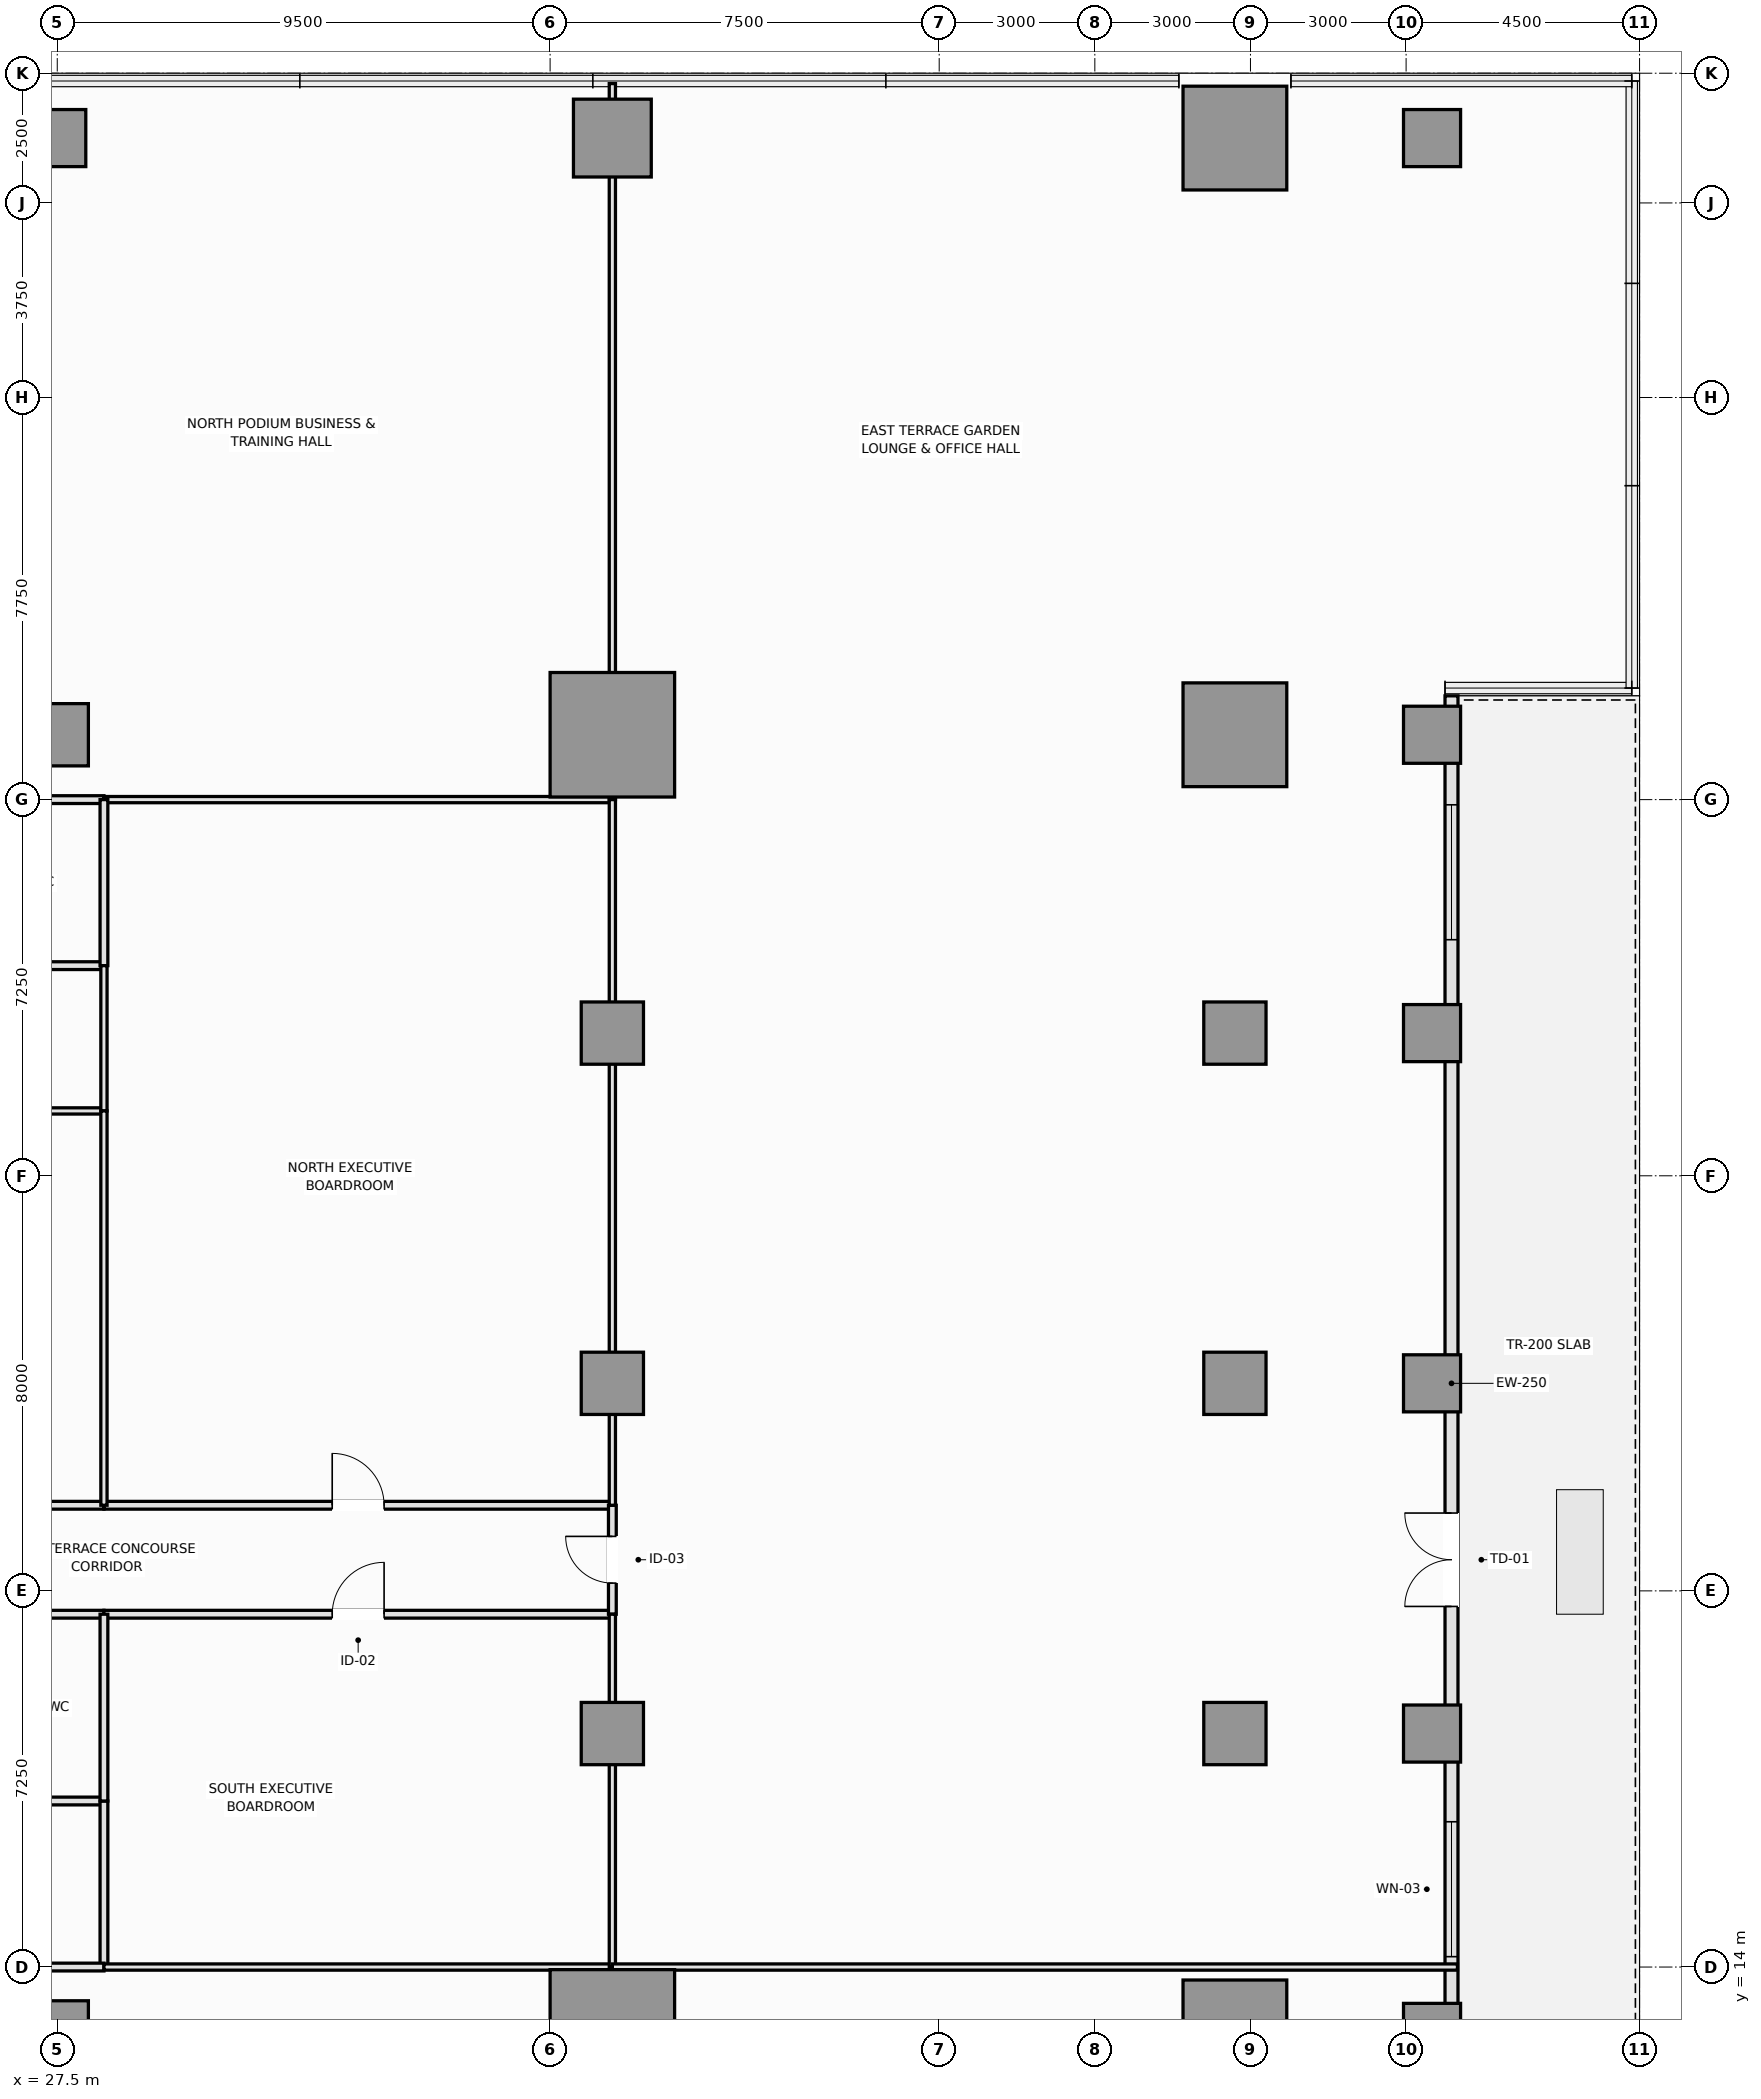
"""IFC4 building model, lengths in metres.
Left out: names, types, materials, properties, quantities, classifications, styles, units other than length and angle.
Written with IfcOpenShell. Run it as: python <this file> out.ifc"""

import sys

from ifc_helpers import new_model, si_unit, direction, frame, frame_2d, origin, origin_2d, place, context, subcontext, project, spatial, rectangle, extrude, element, fill, save


model = new_model("IFC4")
c1 = context("Model", 3, precision=1e-05, world=origin(), true_north=direction((0.0, 1.0)))
c2 = subcontext(c1, "Body", "Model", "MODEL_VIEW")
j1 = project(units=[si_unit("LENGTHUNIT", "METRE"), si_unit("PLANEANGLEUNIT", "RADIAN")], contexts=[c1])
p1 = place(None, origin())
s1 = spatial("IfcSite", under=j1, at=p1, CompositionType="ELEMENT")
p2 = place(p1, origin())
s2 = spatial("IfcBuilding", under=s1, at=p2, CompositionType="ELEMENT")
p3 = place(p2, frame((0.0, 0.0, 20.4)))
s3 = spatial("IfcBuildingStorey", under=s2, at=p3, CompositionType="ELEMENT", Elevation=20.4)
for number, where, z_axis, x_axis in (
    (1, (38.2, 12.75, 0.0), (0.0, 0.0, 1.0), (1.0, 0.0, 0.0)),
    (2, (38.2, 37.75, 0.0), (0.0, 0.0, 1.0), (1.0, 0.0, 0.0)),
):
    element("IfcColumn", number, at=place(p3, frame(where, z_axis=z_axis, x_axis=x_axis)), inside=s3, PredefinedType="COLUMN", context=c2, shape_type="SweptSolid", body=[
        extrude(rectangle(XDim=2.4, YDim=2.4, at=origin_2d()), origin(), (0.0, 0.0, 1.0), 5.2),
    ])
for number, where, z_axis, x_axis in (
    (3, (27.5, 12.75, 0.0), (0.0, 0.0, 1.0), (1.0, 0.0, 0.0)),
    (4, (27.5, 37.75, 0.0), (0.0, 0.0, 1.0), (1.0, 0.0, 0.0)),
    (5, (38.2, 18.5, 0.0), (0.0, 0.0, 1.0), (1.0, 0.0, 0.0)),
    (6, (38.2, 25.25, 0.0), (0.0, 0.0, 1.0), (1.0, 0.0, 0.0)),
    (7, (38.2, 32.0, 0.0), (0.0, 0.0, 1.0), (1.0, 0.0, 0.0)),
):
    element("IfcColumn", number, at=place(p3, frame(where, z_axis=z_axis, x_axis=x_axis)), inside=s3, PredefinedType="COLUMN", context=c2, shape_type="SweptSolid", body=[
        extrude(rectangle(XDim=1.2, YDim=1.2, at=origin_2d()), origin(), (0.0, 0.0, 1.0), 5.2),
    ])
for number, where, z_axis, x_axis in (
    (8, (50.2, 12.75, 0.0), (0.0, 0.0, 1.0), (1.0, 0.0, 0.0)),
    (9, (50.2, 37.75, 0.0), (0.0, 0.0, 1.0), (1.0, 0.0, 0.0)),
    (10, (50.2, 49.25, 0.0), (0.0, 0.0, 1.0), (1.0, 0.0, 0.0)),
):
    element("IfcColumn", number, at=place(p3, frame(where, z_axis=z_axis, x_axis=x_axis)), inside=s3, PredefinedType="COLUMN", context=c2, shape_type="SweptSolid", body=[
        extrude(rectangle(XDim=2.0, YDim=2.0, at=origin_2d()), origin(), (0.0, 0.0, 1.0), 5.2),
    ])
for number, where, z_axis, x_axis in (
    (11, (50.2, 18.5, 0.0), (0.0, 0.0, 1.0), (1.0, 0.0, 0.0)),
    (12, (50.2, 25.25, 0.0), (0.0, 0.0, 1.0), (1.0, 0.0, 0.0)),
    (13, (50.2, 32.0, 0.0), (0.0, 0.0, 1.0), (1.0, 0.0, 0.0)),
):
    element("IfcColumn", number, at=place(p3, frame(where, z_axis=z_axis, x_axis=x_axis)), inside=s3, PredefinedType="COLUMN", context=c2, shape_type="SweptSolid", body=[
        extrude(rectangle(XDim=1.2, YDim=1.2, at=origin_2d()), origin(), (0.0, 0.0, 1.0), 5.2),
    ])
for number, where, z_axis, x_axis in (
    (14, (54.0, 12.75, 0.0), (0.0, 0.0, 1.0), (1.0, 0.0, 0.0)),
    (15, (54.0, 18.5, 0.0), (0.0, 0.0, 1.0), (1.0, 0.0, 0.0)),
    (16, (54.0, 25.25, 0.0), (0.0, 0.0, 1.0), (1.0, 0.0, 0.0)),
    (17, (54.0, 32.0, 0.0), (0.0, 0.0, 1.0), (1.0, 0.0, 0.0)),
    (18, (54.0, 37.75, 0.0), (0.0, 0.0, 1.0), (1.0, 0.0, 0.0)),
    (19, (54.0, 49.25, 0.0), (0.0, 0.0, 1.0), (1.0, 0.0, 0.0)),
    (20, (27.5, 49.25, 0.0), (0.0, 0.0, 1.0), (1.0, 0.0, 0.0)),
):
    element("IfcColumn", number, at=place(p3, frame(where, z_axis=z_axis, x_axis=x_axis)), inside=s3, PredefinedType="COLUMN", context=c2, shape_type="SweptSolid", body=[
        extrude(rectangle(XDim=1.1, YDim=1.1, at=origin_2d()), origin(), (0.0, 0.0, 1.0), 5.2),
    ])
p4 = place(p3, frame((38.2, 49.25, 0.0), z_axis=(0.0, 0.0, 1.0), x_axis=(1.0, 0.0, 0.0)))
e21 = element("IfcColumn", 21, at=p4, inside=s3, PredefinedType="COLUMN", context=c2, shape_type="SweptSolid", body=[
    extrude(rectangle(XDim=1.5, YDim=1.5, at=origin_2d()), origin(), (0.0, 0.0, 1.0), 5.2),
])
p5 = place(p3, frame((54.375, 12.0, 0.0), z_axis=(0.0, 0.0, 1.0), x_axis=(0.0, 1.0, 0.0)))
e22 = element("IfcWall", 22, at=p5, inside=s3, PredefinedType="SOLIDWALL", context=c2, shape_type="SweptSolid", body=[
    extrude(rectangle(XDim=26.5, YDim=0.25, at=frame_2d((13.25, 0.0))), origin(), (0.0, 0.0, 1.0), 5.02),
])
p6 = place(p5, frame((8.95, 0.0, 0.0)))
e23 = element("IfcOpeningElement", 23, at=p6, cuts=e22, PredefinedType="OPENING", context=c2, shape_type="SweptSolid", body=[
    extrude(rectangle(XDim=1.8, YDim=2.2, at=frame_2d((0.9, 1.1))), frame((0.0, 0.135, 0.0), z_axis=(0.0, -1.0, 0.0), x_axis=(1.0, 0.0, 0.0)), (0.0, 0.0, 1.0), 0.27),
])
p7 = place(p5, frame((2.2, 0.0, 0.9)))
e24 = element("IfcOpeningElement", 24, at=p7, cuts=e22, PredefinedType="OPENING", context=c2, shape_type="SweptSolid", body=[
    extrude(rectangle(XDim=2.6, YDim=2.2, at=frame_2d((1.3, 1.1))), frame((0.0, 0.135, 0.0), z_axis=(0.0, -1.0, 0.0), x_axis=(1.0, 0.0, 0.0)), (0.0, 0.0, 1.0), 0.27),
])
p8 = place(p5, frame((21.8, 0.0, 0.9)))
e25 = element("IfcOpeningElement", 25, at=p8, cuts=e22, PredefinedType="OPENING", context=c2, shape_type="SweptSolid", body=[
    extrude(rectangle(XDim=2.6, YDim=2.2, at=frame_2d((1.3, 1.1))), frame((0.0, 0.135, 0.0), z_axis=(0.0, -1.0, 0.0), x_axis=(1.0, 0.0, 0.0)), (0.0, 0.0, 1.0), 0.27),
])
p9 = place(p3, frame((24.55, 20.8, 0.0), z_axis=(0.0, 0.0, 1.0), x_axis=(1.0, 0.0, 0.0)))
e26 = element("IfcWall", 26, at=p9, inside=s3, PredefinedType="PLUMBINGWALL", context=c2, shape_type="SweptSolid", body=[
    extrude(rectangle(XDim=3.85, YDim=0.15, at=frame_2d((1.925, 0.0))), origin(), (0.0, 0.0, 1.0), 5.02),
])
p10 = place(p3, frame((28.4, 20.8, 0.0), z_axis=(0.0, 0.0, 1.0), x_axis=(1.0, 0.0, 0.0)))
e27 = element("IfcWall", 27, at=p10, inside=s3, PredefinedType="PARTITIONING", context=c2, shape_type="SweptSolid", body=[
    extrude(rectangle(XDim=9.8, YDim=0.15, at=frame_2d((4.9, 0.0))), origin(), (0.0, 0.0, 1.0), 5.02),
])
p11 = place(p10, frame((4.4, 0.0, 0.0)))
e28 = element("IfcOpeningElement", 28, at=p11, cuts=e27, PredefinedType="OPENING", context=c2, shape_type="SweptSolid", body=[
    extrude(rectangle(XDim=1.0, YDim=2.15, at=frame_2d((0.5, 1.075))), frame((0.0, 0.085, 0.0), z_axis=(0.0, -1.0, 0.0), x_axis=(1.0, 0.0, 0.0)), (0.0, 0.0, 1.0), 0.17),
])
p12 = place(p3, frame((24.55, 22.9, 0.0), z_axis=(0.0, 0.0, 1.0), x_axis=(1.0, 0.0, 0.0)))
e29 = element("IfcWall", 29, at=p12, inside=s3, PredefinedType="PARTITIONING", context=c2, shape_type="SweptSolid", body=[
    extrude(rectangle(XDim=3.85, YDim=0.15, at=frame_2d((1.925, 0.0))), origin(), (0.0, 0.0, 1.0), 5.02),
])
p13 = place(p3, frame((28.4, 22.9, 0.0), z_axis=(0.0, 0.0, 1.0), x_axis=(1.0, 0.0, 0.0)))
e30 = element("IfcWall", 30, at=p13, inside=s3, PredefinedType="PARTITIONING", context=c2, shape_type="SweptSolid", body=[
    extrude(rectangle(XDim=9.8, YDim=0.15, at=frame_2d((4.9, 0.0))), origin(), (0.0, 0.0, 1.0), 5.02),
])
p14 = place(p13, frame((4.4, 0.0, 0.0)))
e31 = element("IfcOpeningElement", 31, at=p14, cuts=e30, PredefinedType="OPENING", context=c2, shape_type="SweptSolid", body=[
    extrude(rectangle(XDim=1.0, YDim=2.15, at=frame_2d((0.5, 1.075))), frame((0.0, 0.085, 0.0), z_axis=(0.0, -1.0, 0.0), x_axis=(1.0, 0.0, 0.0)), (0.0, 0.0, 1.0), 0.17),
])
p15 = place(p3, frame((38.2, 20.8, 0.0), z_axis=(0.0, 0.0, 1.0), x_axis=(0.0, 1.0, 0.0)))
e32 = element("IfcWall", 32, at=p15, inside=s3, PredefinedType="PARTITIONING", context=c2, shape_type="SweptSolid", body=[
    extrude(rectangle(XDim=2.1, YDim=0.15, at=frame_2d((1.05, 0.0))), origin(), (0.0, 0.0, 1.0), 4.42),
])
p16 = place(p15, frame((0.6, 0.0, 0.0)))
e33 = element("IfcOpeningElement", 33, at=p16, cuts=e32, PredefinedType="OPENING", context=c2, shape_type="SweptSolid", body=[
    extrude(rectangle(XDim=0.9, YDim=2.1, at=frame_2d((0.45, 1.05))), frame((0.0, 0.085, 0.0), z_axis=(0.0, -1.0, 0.0), x_axis=(1.0, 0.0, 0.0)), (0.0, 0.0, 1.0), 0.17),
])
p17 = place(p3, frame((24.55, 36.5, 0.0), z_axis=(0.0, 0.0, 1.0), x_axis=(1.0, 0.0, 0.0)))
e34 = element("IfcWall", 34, at=p17, inside=s3, PredefinedType="PLUMBINGWALL", context=c2, shape_type="SweptSolid", body=[
    extrude(rectangle(XDim=3.85, YDim=0.15, at=frame_2d((1.925, 0.0))), origin(), (0.0, 0.0, 1.0), 5.02),
])
p18 = place(p3, frame((28.4, 36.5, 0.0), z_axis=(0.0, 0.0, 1.0), x_axis=(1.0, 0.0, 0.0)))
e35 = element("IfcWall", 35, at=p18, inside=s3, PredefinedType="PARTITIONING", context=c2, shape_type="SweptSolid", body=[
    extrude(rectangle(XDim=9.8, YDim=0.12, at=frame_2d((4.9, 0.0))), origin(), (0.0, 0.0, 1.0), 5.02),
])
p19 = place(p3, frame((38.2, 36.5, 0.0), z_axis=(0.0, 0.0, 1.0), x_axis=(0.0, 1.0, 0.0)))
e36 = element("IfcWall", 36, at=p19, inside=s3, PredefinedType="PARTITIONING", context=c2, shape_type="SweptSolid", body=[
    extrude(rectangle(XDim=13.8, YDim=0.12, at=frame_2d((6.9, 0.0))), origin(), (0.0, 0.0, 1.0), 3.0),
])
p20 = place(p3, frame((24.55, 17.2, 0.0), z_axis=(0.0, 0.0, 1.0), x_axis=(1.0, 0.0, 0.0)))
e37 = element("IfcWall", 37, at=p20, inside=s3, PredefinedType="PLUMBINGWALL", context=c2, shape_type="SweptSolid", body=[
    extrude(rectangle(XDim=3.85, YDim=0.15, at=frame_2d((1.925, 0.0))), origin(), (0.0, 0.0, 1.0), 5.02),
])
p21 = place(p3, frame((28.4, 14.0, 0.0), z_axis=(0.0, 0.0, 1.0), x_axis=(0.0, 1.0, 0.0)))
e38 = element("IfcWall", 38, at=p21, inside=s3, PredefinedType="PLUMBINGWALL", context=c2, shape_type="SweptSolid", body=[
    extrude(rectangle(XDim=3.2, YDim=0.15, at=frame_2d((1.6, 0.0))), origin(), (0.0, 0.0, 1.0), 5.02),
])
for number, where, z_axis, x_axis in (
    (39, (24.55, 14.0, 0.0), (0.0, 0.0, 1.0), (1.0, 0.0, 0.0)),
    (40, (24.55, 33.3, 0.0), (0.0, 0.0, 1.0), (1.0, 0.0, 0.0)),
):
    element("IfcWall", number, at=place(p3, frame(where, z_axis=z_axis, x_axis=x_axis)), inside=s3, PredefinedType="PLUMBINGWALL", context=c2, shape_type="SweptSolid", body=[
        extrude(rectangle(XDim=3.85, YDim=0.15, at=frame_2d((1.925, 0.0))), origin(), (0.0, 0.0, 1.0), 5.02),
    ])
p22 = place(p3, frame((28.4, 33.3, 0.0), z_axis=(0.0, 0.0, 1.0), x_axis=(0.0, 1.0, 0.0)))
e41 = element("IfcWall", 41, at=p22, inside=s3, PredefinedType="PLUMBINGWALL", context=c2, shape_type="SweptSolid", body=[
    extrude(rectangle(XDim=3.2, YDim=0.15, at=frame_2d((1.6, 0.0))), origin(), (0.0, 0.0, 1.0), 5.02),
])
p23 = place(p3, frame((28.4, 17.2, 0.0), z_axis=(0.0, 0.0, 1.0), x_axis=(0.0, 1.0, 0.0)))
e42 = element("IfcWall", 42, at=p23, inside=s3, PredefinedType="PLUMBINGWALL", context=c2, shape_type="SweptSolid", body=[
    extrude(rectangle(XDim=3.6, YDim=0.15, at=frame_2d((1.8, 0.0))), origin(), (0.0, 0.0, 1.0), 5.02),
])
p24 = place(p3, frame((24.55, 30.5, 0.0), z_axis=(0.0, 0.0, 1.0), x_axis=(1.0, 0.0, 0.0)))
e43 = element("IfcWall", 43, at=p24, inside=s3, PredefinedType="PARTITIONING", context=c2, shape_type="SweptSolid", body=[
    extrude(rectangle(XDim=3.85, YDim=0.12, at=frame_2d((1.925, 0.0))), origin(), (0.0, 0.0, 1.0), 5.02),
])
p25 = place(p3, frame((28.4, 30.5, 0.0), z_axis=(0.0, 0.0, 1.0), x_axis=(0.0, 1.0, 0.0)))
e44 = element("IfcWall", 44, at=p25, inside=s3, PredefinedType="PARTITIONING", context=c2, shape_type="SweptSolid", body=[
    extrude(rectangle(XDim=2.8, YDim=0.12, at=frame_2d((1.4, 0.0))), origin(), (0.0, 0.0, 1.0), 5.02),
])
p26 = place(p3, frame((28.4, 14.0, 0.0), z_axis=(0.0, 0.0, 1.0), x_axis=(1.0, 0.0, 0.0)))
e45 = element("IfcWall", 45, at=p26, inside=s3, PredefinedType="PARTITIONING", context=c2, shape_type="SweptSolid", body=[
    extrude(rectangle(XDim=9.8, YDim=0.12, at=frame_2d((4.9, 0.0))), origin(), (0.0, 0.0, 1.0), 5.02),
])
p27 = place(p3, frame((38.2, 14.0, 0.0), z_axis=(0.0, 0.0, 1.0), x_axis=(0.0, 1.0, 0.0)))
e46 = element("IfcWall", 46, at=p27, inside=s3, PredefinedType="PARTITIONING", context=c2, shape_type="SweptSolid", body=[
    extrude(rectangle(XDim=6.8, YDim=0.12, at=frame_2d((3.4, 0.0))), origin(), (0.0, 0.0, 1.0), 4.42),
])
p28 = place(p3, frame((28.4, 22.9, 0.0), z_axis=(0.0, 0.0, 1.0), x_axis=(0.0, 1.0, 0.0)))
e47 = element("IfcWall", 47, at=p28, inside=s3, PredefinedType="PARTITIONING", context=c2, shape_type="SweptSolid", body=[
    extrude(rectangle(XDim=7.6, YDim=0.12, at=frame_2d((3.8, 0.0))), origin(), (0.0, 0.0, 1.0), 5.02),
])
p29 = place(p3, frame((38.2, 22.9, 0.0), z_axis=(0.0, 0.0, 1.0), x_axis=(0.0, 1.0, 0.0)))
e48 = element("IfcWall", 48, at=p29, inside=s3, PredefinedType="PARTITIONING", context=c2, shape_type="SweptSolid", body=[
    extrude(rectangle(XDim=13.6, YDim=0.12, at=frame_2d((6.8, 0.0))), origin(), (0.0, 0.0, 1.0), 4.42),
])
p30 = place(p3, frame((38.2, 14.0, 0.0), z_axis=(0.0, 0.0, 1.0), x_axis=(1.0, 0.0, 0.0)))
e49 = element("IfcWall", 49, at=p30, inside=s3, PredefinedType="PARTITIONING", context=c2, shape_type="SweptSolid", body=[
    extrude(rectangle(XDim=16.29, YDim=0.12, at=frame_2d((8.145, 0.0))), origin(), (0.0, 0.0, 1.0), 5.02),
])
p31 = place(p6, frame((1.8, 0.0, 0.0), z_axis=(0.0, 0.0, 1.0), x_axis=(-1.0, 0.0, 0.0)))
e50 = element("IfcDoor", 50, at=p31, inside=s3, OperationType="DOUBLE_DOOR_SINGLE_SWING", PredefinedType="DOOR", context=c2, shape_type="SweptSolid", body=[
    extrude(rectangle(XDim=1.8, YDim=2.2, at=frame_2d((0.9, 1.1))), frame((0.0, 0.025, 0.0), z_axis=(0.0, -1.0, 0.0), x_axis=(1.0, 0.0, 0.0)), (0.0, 0.0, 1.0), 0.05),
])
fill(e23, e50)
p32 = place(p7, origin())
e51 = element("IfcWindow", 51, at=p32, inside=s3, PartitioningType="SINGLE_PANEL", PredefinedType="WINDOW", context=c2, shape_type="SweptSolid", body=[
    extrude(rectangle(XDim=2.6, YDim=2.2, at=frame_2d((1.3, 1.1))), frame((0.0, 0.03, 0.0), z_axis=(0.0, -1.0, 0.0), x_axis=(1.0, 0.0, 0.0)), (0.0, 0.0, 1.0), 0.06),
])
fill(e24, e51)
p33 = place(p8, origin())
e52 = element("IfcWindow", 52, at=p33, inside=s3, PartitioningType="SINGLE_PANEL", PredefinedType="WINDOW", context=c2, shape_type="SweptSolid", body=[
    extrude(rectangle(XDim=2.6, YDim=2.2, at=frame_2d((1.3, 1.1))), frame((0.0, 0.03, 0.0), z_axis=(0.0, -1.0, 0.0), x_axis=(1.0, 0.0, 0.0)), (0.0, 0.0, 1.0), 0.06),
])
fill(e25, e52)
p34 = place(p11, origin())
e53 = element("IfcDoor", 53, at=p34, inside=s3, OperationType="SINGLE_SWING_RIGHT", PredefinedType="DOOR", context=c2, shape_type="SweptSolid", body=[
    extrude(rectangle(XDim=1.0, YDim=2.15, at=frame_2d((0.5, 1.075))), frame((0.0, 0.025, 0.0), z_axis=(0.0, -1.0, 0.0), x_axis=(1.0, 0.0, 0.0)), (0.0, 0.0, 1.0), 0.05),
])
fill(e28, e53)
p35 = place(p14, origin())
e54 = element("IfcDoor", 54, at=p35, inside=s3, OperationType="SINGLE_SWING_LEFT", PredefinedType="DOOR", context=c2, shape_type="SweptSolid", body=[
    extrude(rectangle(XDim=1.0, YDim=2.15, at=frame_2d((0.5, 1.075))), frame((0.0, 0.025, 0.0), z_axis=(0.0, -1.0, 0.0), x_axis=(1.0, 0.0, 0.0)), (0.0, 0.0, 1.0), 0.05),
])
fill(e31, e54)
p36 = place(p16, origin())
e55 = element("IfcDoor", 55, at=p36, inside=s3, OperationType="SINGLE_SWING_RIGHT", PredefinedType="DOOR", context=c2, shape_type="SweptSolid", body=[
    extrude(rectangle(XDim=0.9, YDim=2.1, at=frame_2d((0.45, 1.05))), frame((0.0, 0.025, 0.0), z_axis=(0.0, -1.0, 0.0), x_axis=(1.0, 0.0, 0.0)), (0.0, 0.0, 1.0), 0.05),
])
fill(e33, e55)
save(model, sys.argv[1])
